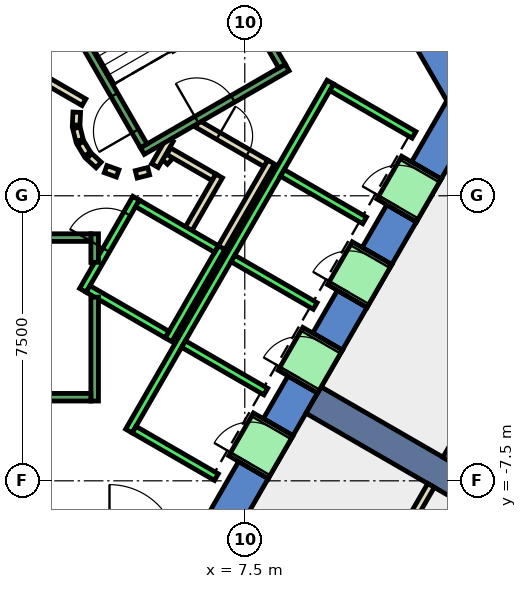
"""IFC4 building model, lengths in metres.
Left out: names, types, materials, properties, quantities, classifications, styles, units other than length and angle.
Written with IfcOpenShell. Run it as: python <this file> out.ifc"""

import sys

from ifc_helpers import new_model, si_unit, direction, frame, frame_2d, origin, place, context, subcontext, project, spatial, polyline, rectangle, outline, extrude, element, fill, save


model = new_model("IFC4")
c1 = context("Model", 3, precision=1e-05, world=origin(), true_north=direction((0.0, 1.0)))
c2 = subcontext(c1, "Body", "Model", "MODEL_VIEW")
j1 = project(units=[si_unit("LENGTHUNIT", "METRE"), si_unit("PLANEANGLEUNIT", "RADIAN")], contexts=[c1])
p1 = place(None, origin())
s1 = spatial("IfcSite", under=j1, at=p1, CompositionType="ELEMENT")
p2 = place(p1, origin())
s2 = spatial("IfcBuilding", under=s1, at=p2, CompositionType="ELEMENT")
p3 = place(p2, frame((0.0, 0.0, 111.8)))
s3 = spatial("IfcBuildingStorey", under=s2, at=p3, CompositionType="ELEMENT", Elevation=111.8)
p4 = place(p3, frame((0.0, 0.0, -0.4)))
e1 = element("IfcWall", 1, at=p4, inside=s3, PredefinedType="SHEAR", context=c2, shape_type="SweptSolid", body=[
    extrude(outline(polyline([(8.517, 11.748), (7.738, 11.298), (12.817, 2.5), (13.856, 2.5), (8.517, 11.748)])), origin(), (0.0, 0.0, 1.0), 4.2),
])
p5 = place(p3, frame((0.0, 0.0, -0.4)))
e2 = element("IfcWall", 2, at=p5, inside=s3, PredefinedType="SHEAR", context=c2, shape_type="SweptSolid", body=[
    extrude(outline(polyline([(8.117, -7.44), (7.338, -6.99), (6.409, -8.6), (6.928, -9.5), (8.117, -7.44)])), origin(), (0.0, 0.0, 1.0), 4.2),
])
p6 = place(p3, frame((0.0, 0.0, -0.4)))
e3 = element("IfcWall", 3, at=p6, inside=s3, PredefinedType="SHEAR", context=c2, shape_type="SweptSolid", body=[
    extrude(outline(polyline([(9.417, -5.189), (8.638, -4.739), (7.988, -5.864), (8.767, -6.314), (9.417, -5.189)])), origin(), (0.0, 0.0, 1.0), 4.2),
])
p7 = place(p3, frame((0.0, 0.0, -0.4)))
e4 = element("IfcWall", 4, at=p7, inside=s3, PredefinedType="SHEAR", context=c2, shape_type="SweptSolid", body=[
    extrude(outline(polyline([(10.717, -2.937), (9.938, -2.487), (9.288, -3.613), (10.067, -4.063), (10.717, -2.937)])), origin(), (0.0, 0.0, 1.0), 4.2),
])
p8 = place(p3, frame((0.0, 0.0, -0.4)))
e5 = element("IfcWall", 5, at=p8, inside=s3, PredefinedType="SHEAR", context=c2, shape_type="SweptSolid", body=[
    extrude(outline(polyline([(12.017, -0.686), (11.238, -0.236), (10.588, -1.361), (11.367, -1.811), (12.017, -0.686)])), origin(), (0.0, 0.0, 1.0), 4.2),
])
p9 = place(p3, frame((0.0, 0.0, -0.4)))
e6 = element("IfcWall", 6, at=p9, inside=s3, PredefinedType="SHEAR", context=c2, shape_type="SweptSolid", body=[
    extrude(outline(polyline([(11.888, 0.89), (12.667, 0.44), (13.856, 2.5), (12.817, 2.5), (11.888, 0.89)])), origin(), (0.0, 0.0, 1.0), 4.2),
])
p10 = place(p3, frame((0.0, 0.0, 3.6)))
e7 = element("IfcWall", 7, at=p10, inside=s3, PredefinedType="SHEAR", context=c2, shape_type="SweptSolid", body=[
    extrude(outline(polyline([(8.767, -6.314), (7.988, -5.864), (7.338, -6.99), (8.117, -7.44), (8.767, -6.314)])), origin(), (0.0, 0.0, 1.0), 0.2),
])
p11 = place(p3, frame((0.0, 0.0, 3.6)))
e8 = element("IfcWall", 8, at=p11, inside=s3, PredefinedType="SHEAR", context=c2, shape_type="SweptSolid", body=[
    extrude(outline(polyline([(10.067, -4.063), (9.288, -3.613), (8.638, -4.739), (9.417, -5.189), (10.067, -4.063)])), origin(), (0.0, 0.0, 1.0), 0.2),
])
p12 = place(p3, frame((0.0, 0.0, 3.6)))
e9 = element("IfcWall", 9, at=p12, inside=s3, PredefinedType="SHEAR", context=c2, shape_type="SweptSolid", body=[
    extrude(outline(polyline([(11.367, -1.811), (10.588, -1.361), (9.938, -2.487), (10.717, -2.937), (11.367, -1.811)])), origin(), (0.0, 0.0, 1.0), 0.2),
])
p13 = place(p3, frame((0.0, 0.0, 3.6)))
e10 = element("IfcWall", 10, at=p13, inside=s3, PredefinedType="SHEAR", context=c2, shape_type="SweptSolid", body=[
    extrude(outline(polyline([(12.667, 0.44), (11.888, 0.89), (11.238, -0.236), (12.017, -0.686), (12.667, 0.44)])), origin(), (0.0, 0.0, 1.0), 0.2),
])
p14 = place(p3, frame((9.31, -5.375, -0.4), z_axis=(0.0, 0.0, 1.0), x_axis=(0.866017533419, -0.500013631625, 0.0)))
e11 = element("IfcWall", 11, at=p14, inside=s3, PredefinedType="SHEAR", context=c2, shape_type="SweptSolid", body=[
    extrude(rectangle(XDim=9.0, YDim=0.8, at=frame_2d((4.5, 0.0))), origin(), (0.0, 0.0, 1.0), 4.2),
])
p15 = place(p3, frame((5.39, 0.898, 0.0), z_axis=(0.0, 0.0, 1.0), x_axis=(0.673828488714, 0.738887791073, 0.0)))
e12 = element("IfcWall", 12, at=p15, inside=s3, PredefinedType="PARTITIONING", context=c2, shape_type="SweptSolid", body=[
    extrude(rectangle(XDim=0.263, YDim=0.2, at=frame_2d((0.131, 0.0))), origin(), (0.0, 0.0, 1.0), 3.8),
])
p16 = place(p3, frame((5.499, 1.172, 0.0), z_axis=(0.0, 0.0, 1.0), x_axis=(0.866333505267, -0.499465972466, 0.0)))
e13 = element("IfcWall", 13, at=p16, inside=s3, PredefinedType="PARTITIONING", context=c2, shape_type="SweptSolid", body=[
    extrude(rectangle(XDim=1.374, YDim=0.2, at=frame_2d((0.687, 0.0))), origin(), (0.0, 0.0, 1.0), 3.8),
])
p17 = place(p3, frame((6.826, 0.522, 0.0), z_axis=(0.0, 0.0, 1.0), x_axis=(-0.500016722714, -0.866015748706, 0.0)))
e14 = element("IfcWall", 14, at=p17, inside=s3, PredefinedType="PARTITIONING", context=c2, shape_type="SweptSolid", body=[
    extrude(rectangle(XDim=1.7, YDim=0.2, at=frame_2d((0.85, 0.0))), origin(), (0.0, 0.0, 1.0), 3.8),
])
p18 = place(p3, frame((6.25, 1.894, 0.0), z_axis=(0.0, 0.0, 1.0), x_axis=(0.866043184279, -0.499969202016, 0.0)))
e15 = element("IfcWall", 15, at=p18, inside=s3, PredefinedType="PARTITIONING", context=c2, shape_type="SweptSolid", body=[
    extrude(rectangle(XDim=2.084, YDim=0.2, at=frame_2d((1.042, 0.0))), origin(), (0.0, 0.0, 1.0), 3.8),
])
p19 = place(p18, frame((0.642, 0.0, 0.0)))
e16 = element("IfcOpeningElement", 16, at=p19, cuts=e15, PredefinedType="OPENING", context=c2, shape_type="SweptSolid", body=[
    extrude(rectangle(XDim=0.9, YDim=2.1, at=frame_2d((0.45, 1.05))), frame((0.0, 0.11, 0.0), z_axis=(0.0, -1.0, 0.0), x_axis=(1.0, 0.0, 0.0)), (0.0, 0.0, 1.0), 0.22),
])
p20 = place(p3, frame((8.192, 0.888, 0.0), z_axis=(0.0, 0.0, 1.0), x_axis=(-0.499940625693, -0.866059680843, 0.0)))
e17 = element("IfcWall", 17, at=p20, inside=s3, PredefinedType="PARTITIONING", context=c2, shape_type="SweptSolid", body=[
    extrude(rectangle(XDim=2.68, YDim=0.2, at=frame_2d((1.34, 0.0))), origin(), (0.0, 0.0, 1.0), 3.8),
])
p21 = place(p3, frame((5.135, 0.793, 0.0), z_axis=(0.0, 0.0, 1.0), x_axis=(0.499526442893, 0.866298639529, 0.0)))
e18 = element("IfcWall", 18, at=p21, inside=s3, PredefinedType="PARTITIONING", context=c2, shape_type="SweptSolid", body=[
    extrude(rectangle(XDim=0.791, YDim=0.2, at=frame_2d((0.396, 0.0))), origin(), (0.0, 0.0, 1.0), 3.8),
])
p22 = place(p3, frame((2.012, 3.186, 0.0), z_axis=(0.0, 0.0, 1.0), x_axis=(0.865891012941, -0.500232699559, 0.0)))
e19 = element("IfcWall", 19, at=p22, inside=s3, PredefinedType="PARTITIONING", context=c2, shape_type="SweptSolid", body=[
    extrude(rectangle(XDim=1.449, YDim=0.2, at=frame_2d((0.725, 0.0))), origin(), (0.0, 0.0, 1.0), 3.8),
])
p23 = place(p3, frame((3.079, 2.199, 0.0), z_axis=(0.0, 0.0, 1.0), x_axis=(-0.047771483479, -0.998858290933, 0.0)))
e20 = element("IfcWall", 20, at=p23, inside=s3, PredefinedType="PARTITIONING", context=c2, shape_type="SweptSolid", body=[
    extrude(rectangle(XDim=0.337, YDim=0.2, at=frame_2d((0.169, 0.0))), origin(), (0.0, 0.0, 1.0), 3.8),
])
p24 = place(p3, frame((3.07, 1.786, 0.0), z_axis=(0.0, 0.0, 1.0), x_axis=(0.242705583207, -0.970099994784, 0.0)))
e21 = element("IfcWall", 21, at=p24, inside=s3, PredefinedType="PARTITIONING", context=c2, shape_type="SweptSolid", body=[
    extrude(rectangle(XDim=0.338, YDim=0.2, at=frame_2d((0.169, 0.0))), origin(), (0.0, 0.0, 1.0), 3.8),
])
for number, where, z_axis, x_axis in (
    (22, (3.182, 1.388, 0.0), (0.0, 0.0, 1.0), (0.512, -0.859, 0.0)),
    (23, (3.404, 1.039, 0.0), (0.0, 0.0, 1.0), (0.74, -0.672, 0.0)),
):
    element("IfcWall", number, at=place(p3, frame(where, z_axis=z_axis, x_axis=x_axis)), inside=s3, PredefinedType="PARTITIONING", context=c2, shape_type="SweptSolid", body=[
        extrude(rectangle(XDim=0.338, YDim=0.2, at=frame_2d((0.169, 0.0))), origin(), (0.0, 0.0, 1.0), 3.8),
    ])
p25 = place(p3, frame((3.838, 0.702, 0.0), z_axis=(0.0, 0.0, 1.0), x_axis=(0.941035081519, -0.338308993895, 0.0)))
e24 = element("IfcWall", 24, at=p25, inside=s3, PredefinedType="PARTITIONING", context=c2, shape_type="SweptSolid", body=[
    extrude(rectangle(XDim=0.337, YDim=0.2, at=frame_2d((0.168, 0.0))), origin(), (0.0, 0.0, 1.0), 3.8),
])
p26 = place(p3, frame((4.644, 0.564, 0.0), z_axis=(0.0, 0.0, 1.0), x_axis=(0.969929076366, 0.243387729394, 0.0)))
e25 = element("IfcWall", 25, at=p26, inside=s3, PredefinedType="PARTITIONING", context=c2, shape_type="SweptSolid", body=[
    extrude(rectangle(XDim=0.337, YDim=0.2, at=frame_2d((0.168, 0.0))), origin(), (0.0, 0.0, 1.0), 3.8),
])
p27 = place(p3, frame((18.301, 2.598, 0.0), z_axis=(0.0, 0.0, 1.0), x_axis=(-0.49997732567, -0.866038494419, 0.0)))
e26 = element("IfcWall", 26, at=p27, inside=s3, PredefinedType="PARTITIONING", context=c2, shape_type="SweptSolid", body=[
    extrude(rectangle(XDim=11.0, YDim=0.2, at=frame_2d((5.5, 0.0))), origin(), (0.0, 0.0, 1.0), 3.8),
])
p28 = place(p3, frame((12.401, -7.621, 0.0), z_axis=(0.0, 0.0, 1.0), x_axis=(-0.499983724212, -0.866034800411, 0.0)))
e27 = element("IfcWall", 27, at=p28, inside=s3, PredefinedType="PARTITIONING", context=c2, shape_type="SweptSolid", body=[
    extrude(rectangle(XDim=9.302, YDim=0.2, at=frame_2d((4.651, 0.0))), origin(), (0.0, 0.0, 1.0), 3.8),
])
p29 = place(p3, frame((3.24, -2.488, 0.0), z_axis=(0.0, 0.0, 1.0), x_axis=(0.49994636267, 0.866056369097, 0.0)))
e28 = element("IfcWall", 28, at=p29, inside=s3, PredefinedType="STANDARD", context=c2, shape_type="SweptSolid", body=[
    extrude(rectangle(XDim=2.8, YDim=0.2, at=frame_2d((1.4, 0.0))), origin(), (0.0, 0.0, 1.0), 3.8),
])
p30 = place(p29, frame((1.225, 0.0, 0.0)))
e29 = element("IfcOpeningElement", 29, at=p30, cuts=e28, PredefinedType="OPENING", context=c2, shape_type="SweptSolid", body=[
    extrude(rectangle(XDim=1.1, YDim=2.1, at=frame_2d((0.55, 1.05))), frame((0.0, 0.11, 0.0), z_axis=(0.0, -1.0, 0.0), x_axis=(1.0, 0.0, 0.0)), (0.0, 0.0, 1.0), 0.22),
])
p31 = place(p3, frame((5.492, -3.788, 0.0), z_axis=(0.0, 0.0, 1.0), x_axis=(0.500011755427, 0.866018616679, 0.0)))
e30 = element("IfcWall", 30, at=p31, inside=s3, PredefinedType="STANDARD", context=c2, shape_type="SweptSolid", body=[
    extrude(rectangle(XDim=2.8, YDim=0.2, at=frame_2d((1.4, 0.0))), origin(), (0.0, 0.0, 1.0), 3.8),
])
p32 = place(p3, frame((3.377, -2.452, 0.0), z_axis=(0.0, 0.0, 1.0), x_axis=(0.865955154139, -0.50012165622, 0.0)))
e31 = element("IfcWall", 31, at=p32, inside=s3, PredefinedType="STANDARD", context=c2, shape_type="SweptSolid", body=[
    extrude(rectangle(XDim=2.4, YDim=0.2, at=frame_2d((1.2, 0.0))), origin(), (0.0, 0.0, 1.0), 3.8),
])
p33 = place(p3, frame((4.677, -0.2, 0.0), z_axis=(0.0, 0.0, 1.0), x_axis=(0.865973769406, -0.500089422704, 0.0)))
e32 = element("IfcWall", 32, at=p33, inside=s3, PredefinedType="STANDARD", context=c2, shape_type="SweptSolid", body=[
    extrude(rectangle(XDim=2.399, YDim=0.2, at=frame_2d((1.2, 0.0))), origin(), (0.0, 0.0, 1.0), 3.8),
])
p34 = place(p3, frame((4.451, -6.19, 0.0), z_axis=(0.0, 0.0, 1.0), x_axis=(0.50000090737, 0.866024879913, 0.0)))
e33 = element("IfcWall", 33, at=p34, inside=s3, PredefinedType="STANDARD", context=c2, shape_type="SweptSolid", body=[
    extrude(rectangle(XDim=10.6, YDim=0.2, at=frame_2d((5.3, 0.0))), origin(), (0.0, 0.0, 1.0), 3.8),
])
for number, where, z_axis, x_axis in (
    (34, (4.588, -6.153, 0.0), (0.0, 0.0, 1.0), (0.866, -0.5, 0.0)),
    (35, (5.888, -3.902, 0.0), (0.0, 0.0, 1.0), (0.866, -0.5, 0.0)),
    (36, (7.188, -1.65, 0.0), (0.0, 0.0, 1.0), (0.866, -0.5, 0.0)),
    (37, (8.488, 0.602, 0.0), (0.0, 0.0, 1.0), (0.866, -0.5, 0.0)),
):
    element("IfcWall", number, at=place(p3, frame(where, z_axis=z_axis, x_axis=x_axis)), inside=s3, PredefinedType="STANDARD", context=c2, shape_type="SweptSolid", body=[
        extrude(rectangle(XDim=2.5, YDim=0.2, at=frame_2d((1.25, 0.0))), origin(), (0.0, 0.0, 1.0), 3.8),
    ])
p35 = place(p3, frame((9.788, 2.853, 0.0), z_axis=(0.0, 0.0, 1.0), x_axis=(0.865998541277, -0.500046524342, 0.0)))
e38 = element("IfcWall", 38, at=p35, inside=s3, PredefinedType="STANDARD", context=c2, shape_type="SweptSolid", body=[
    extrude(rectangle(XDim=2.5, YDim=0.2, at=frame_2d((1.25, 0.0))), origin(), (0.0, 0.0, 1.0), 3.8),
])
p36 = place(p3, frame((7.598, -7.14, 0.0), z_axis=(0.0, 0.0, 1.0), x_axis=(0.500362116554, 0.865816234728, 0.0)))
e39 = element("IfcWall", 39, at=p36, inside=s3, PredefinedType="STANDARD", context=c2, shape_type="SweptSolid", body=[
    extrude(rectangle(XDim=1.299, YDim=1.2, at=frame_2d((0.65, 0.0))), origin(), (0.0, 0.0, 1.0), 2.4),
])
p37 = place(p36, frame((0.1, 0.0, 0.0)))
e40 = element("IfcOpeningElement", 40, at=p37, cuts=e39, PredefinedType="OPENING", context=c2, shape_type="SweptSolid", body=[
    extrude(rectangle(XDim=1.1, YDim=2.3, at=frame_2d((0.55, 1.15))), frame((0.0, 0.61, 0.0), z_axis=(0.0, -1.0, 0.0), x_axis=(1.0, 0.0, 0.0)), (0.0, 0.0, 1.0), 1.22),
])
p38 = place(p3, frame((8.898, -4.889, 0.0), z_axis=(0.0, 0.0, 1.0), x_axis=(0.500036693733, 0.866004217611, 0.0)))
e41 = element("IfcWall", 41, at=p38, inside=s3, PredefinedType="STANDARD", context=c2, shape_type="SweptSolid", body=[
    extrude(rectangle(XDim=1.3, YDim=1.2, at=frame_2d((0.65, 0.0))), origin(), (0.0, 0.0, 1.0), 2.4),
])
p39 = place(p38, frame((0.1, 0.0, 0.0)))
e42 = element("IfcOpeningElement", 42, at=p39, cuts=e41, PredefinedType="OPENING", context=c2, shape_type="SweptSolid", body=[
    extrude(rectangle(XDim=1.1, YDim=2.3, at=frame_2d((0.55, 1.15))), frame((0.0, 0.61, 0.0), z_axis=(0.0, -1.0, 0.0), x_axis=(1.0, 0.0, 0.0)), (0.0, 0.0, 1.0), 1.22),
])
p40 = place(p3, frame((10.198, -2.637, 0.0), z_axis=(0.0, 0.0, 1.0), x_axis=(0.49989585183, 0.866085525409, 0.0)))
e43 = element("IfcWall", 43, at=p40, inside=s3, PredefinedType="STANDARD", context=c2, shape_type="SweptSolid", body=[
    extrude(rectangle(XDim=1.3, YDim=1.2, at=frame_2d((0.65, 0.0))), origin(), (0.0, 0.0, 1.0), 2.4),
])
p41 = place(p40, frame((0.1, 0.0, 0.0)))
e44 = element("IfcOpeningElement", 44, at=p41, cuts=e43, PredefinedType="OPENING", context=c2, shape_type="SweptSolid", body=[
    extrude(rectangle(XDim=1.1, YDim=2.3, at=frame_2d((0.55, 1.15))), frame((0.0, 0.61, 0.0), z_axis=(0.0, -1.0, 0.0), x_axis=(1.0, 0.0, 0.0)), (0.0, 0.0, 1.0), 1.22),
])
p42 = place(p3, frame((11.498, -0.385, 0.0), z_axis=(0.0, 0.0, 1.0), x_axis=(0.500221244143, 0.865897630733, 0.0)))
e45 = element("IfcWall", 45, at=p42, inside=s3, PredefinedType="STANDARD", context=c2, shape_type="SweptSolid", body=[
    extrude(rectangle(XDim=1.299, YDim=1.2, at=frame_2d((0.65, 0.0))), origin(), (0.0, 0.0, 1.0), 2.4),
])
p43 = place(p42, frame((0.1, 0.0, 0.0)))
e46 = element("IfcOpeningElement", 46, at=p43, cuts=e45, PredefinedType="OPENING", context=c2, shape_type="SweptSolid", body=[
    extrude(rectangle(XDim=1.1, YDim=2.3, at=frame_2d((0.55, 1.15))), frame((0.0, 0.61, 0.0), z_axis=(0.0, -1.0, 0.0), x_axis=(1.0, 0.0, 0.0)), (0.0, 0.0, 1.0), 1.22),
])
p44 = place(p3, frame((3.55, -2.667, 0.0), z_axis=(0.0, 0.0, 1.0), x_axis=(0.0, -1.0, 0.0)))
e47 = element("IfcWall", 47, at=p44, inside=s3, PredefinedType="STANDARD", context=c2, shape_type="SweptSolid", body=[
    extrude(rectangle(XDim=2.733, YDim=0.2, at=frame_2d((1.366, 0.0))), origin(), (0.0, 0.0, 1.0), 3.8),
])
p45 = place(p3, frame((3.55, -1.0, 0.0), z_axis=(0.0, 0.0, 1.0), x_axis=(0.0, -1.0, 0.0)))
e48 = element("IfcWall", 48, at=p45, inside=s3, PredefinedType="STANDARD", context=c2, shape_type="SweptSolid", body=[
    extrude(rectangle(XDim=0.751, YDim=0.2, at=frame_2d((0.375, 0.0))), origin(), (0.0, 0.0, 1.0), 3.8),
])
p46 = place(p3, frame((-3.45, -1.1, 0.0), z_axis=(0.0, 0.0, 1.0), x_axis=(1.0, 0.0, 0.0)))
e49 = element("IfcWall", 49, at=p46, inside=s3, PredefinedType="STANDARD", context=c2, shape_type="SweptSolid", body=[
    extrude(rectangle(XDim=6.9, YDim=0.2, at=frame_2d((3.45, 0.0))), origin(), (0.0, 0.0, 1.0), 3.8),
])
p47 = place(p46, frame((0.45, 0.0, 0.0)))
e50 = element("IfcOpeningElement", 50, at=p47, cuts=e49, PredefinedType="OPENING", context=c2, shape_type="SweptSolid", body=[
    extrude(rectangle(XDim=1.1, YDim=2.2, at=frame_2d((0.55, 1.1))), frame((0.0, 0.11, 0.0), z_axis=(0.0, -1.0, 0.0), x_axis=(1.0, 0.0, 0.0)), (0.0, 0.0, 1.0), 0.22),
])
p48 = place(p3, frame((-3.45, -5.3, 0.0), z_axis=(0.0, 0.0, 1.0), x_axis=(1.0, 0.0, 0.0)))
e51 = element("IfcWall", 51, at=p48, inside=s3, PredefinedType="STANDARD", context=c2, shape_type="SweptSolid", body=[
    extrude(rectangle(XDim=6.9, YDim=0.2, at=frame_2d((3.45, 0.0))), origin(), (0.0, 0.0, 1.0), 3.8),
])
p49 = place(p3, frame((4.806, 1.176, 0.0), z_axis=(0.0, 0.0, 1.0), x_axis=(0.866059941101, 0.499940174841, 0.0)))
e52 = element("IfcWall", 52, at=p49, inside=s3, PredefinedType="STANDARD", context=c2, shape_type="SweptSolid", body=[
    extrude(rectangle(XDim=4.4, YDim=0.2, at=frame_2d((2.2, 0.0))), origin(), (0.0, 0.0, 1.0), 3.8),
])
p50 = place(p49, frame((1.65, 0.0, 0.0)))
e53 = element("IfcOpeningElement", 53, at=p50, cuts=e52, PredefinedType="OPENING", context=c2, shape_type="SweptSolid", body=[
    extrude(rectangle(XDim=1.1, YDim=2.2, at=frame_2d((0.55, 1.1))), frame((0.0, 0.11, 0.0), z_axis=(0.0, -1.0, 0.0), x_axis=(1.0, 0.0, 0.0)), (0.0, 0.0, 1.0), 0.22),
])
p51 = place(p3, frame((4.843, 1.312, 0.0), z_axis=(0.0, 0.0, 1.0), x_axis=(-0.499963383562, 0.866046543262, 0.0)))
e54 = element("IfcWall", 54, at=p51, inside=s3, PredefinedType="STANDARD", context=c2, shape_type="SweptSolid", body=[
    extrude(rectangle(XDim=6.9, YDim=0.2, at=frame_2d((3.45, 0.0))), origin(), (0.0, 0.0, 1.0), 3.8),
])
p52 = place(p51, frame((0.45, 0.0, 0.0)))
e55 = element("IfcOpeningElement", 55, at=p52, cuts=e54, PredefinedType="OPENING", context=c2, shape_type="SweptSolid", body=[
    extrude(rectangle(XDim=1.1, YDim=2.2, at=frame_2d((0.55, 1.1))), frame((0.0, 0.11, 0.0), z_axis=(0.0, -1.0, 0.0), x_axis=(1.0, 0.0, 0.0)), (0.0, 0.0, 1.0), 0.22),
])
p53 = place(p3, frame((8.48, 3.412, 0.0), z_axis=(0.0, 0.0, 1.0), x_axis=(-0.499978703459, 0.866037698999, 0.0)))
e56 = element("IfcWall", 56, at=p53, inside=s3, PredefinedType="STANDARD", context=c2, shape_type="SweptSolid", body=[
    extrude(rectangle(XDim=6.9, YDim=0.2, at=frame_2d((3.45, 0.0))), origin(), (0.0, 0.0, 1.0), 3.8),
])
p54 = place(p19, origin())
e57 = element("IfcDoor", 57, at=p54, inside=s3, OperationType="SINGLE_SWING_LEFT", PredefinedType="DOOR", context=c2, shape_type="SweptSolid", body=[
    extrude(rectangle(XDim=0.9, YDim=2.1, at=frame_2d((0.45, 1.05))), frame((0.0, 0.025, 0.0), z_axis=(0.0, -1.0, 0.0), x_axis=(1.0, 0.0, 0.0)), (0.0, 0.0, 1.0), 0.05),
])
fill(e16, e57)
p55 = place(p37, origin())
e58 = element("IfcDoor", 58, at=p55, inside=s3, OperationType="SLIDING_TO_LEFT", PredefinedType="DOOR", context=c2, shape_type="SweptSolid", body=[
    extrude(rectangle(XDim=1.1, YDim=2.3, at=frame_2d((0.55, 1.15))), frame((0.0, 0.025, 0.0), z_axis=(0.0, -1.0, 0.0), x_axis=(1.0, 0.0, 0.0)), (0.0, 0.0, 1.0), 0.05),
])
fill(e40, e58)
p56 = place(p39, origin())
e59 = element("IfcDoor", 59, at=p56, inside=s3, OperationType="SLIDING_TO_LEFT", PredefinedType="DOOR", context=c2, shape_type="SweptSolid", body=[
    extrude(rectangle(XDim=1.1, YDim=2.3, at=frame_2d((0.55, 1.15))), frame((0.0, 0.025, 0.0), z_axis=(0.0, -1.0, 0.0), x_axis=(1.0, 0.0, 0.0)), (0.0, 0.0, 1.0), 0.05),
])
fill(e42, e59)
p57 = place(p41, origin())
e60 = element("IfcDoor", 60, at=p57, inside=s3, OperationType="SLIDING_TO_LEFT", PredefinedType="DOOR", context=c2, shape_type="SweptSolid", body=[
    extrude(rectangle(XDim=1.1, YDim=2.3, at=frame_2d((0.55, 1.15))), frame((0.0, 0.025, 0.0), z_axis=(0.0, -1.0, 0.0), x_axis=(1.0, 0.0, 0.0)), (0.0, 0.0, 1.0), 0.05),
])
fill(e44, e60)
p58 = place(p43, origin())
e61 = element("IfcDoor", 61, at=p58, inside=s3, OperationType="SLIDING_TO_LEFT", PredefinedType="DOOR", context=c2, shape_type="SweptSolid", body=[
    extrude(rectangle(XDim=1.1, YDim=2.3, at=frame_2d((0.55, 1.15))), frame((0.0, 0.025, 0.0), z_axis=(0.0, -1.0, 0.0), x_axis=(1.0, 0.0, 0.0)), (0.0, 0.0, 1.0), 0.05),
])
fill(e46, e61)
p59 = place(p30, origin())
e62 = element("IfcDoor", 62, at=p59, inside=s3, OperationType="SLIDING_TO_LEFT", PredefinedType="DOOR", context=c2, shape_type="SweptSolid", body=[
    extrude(rectangle(XDim=1.1, YDim=2.1, at=frame_2d((0.55, 1.05))), frame((0.0, 0.025, 0.0), z_axis=(0.0, -1.0, 0.0), x_axis=(1.0, 0.0, 0.0)), (0.0, 0.0, 1.0), 0.05),
])
fill(e29, e62)
p60 = place(p52, origin())
e63 = element("IfcDoor", 63, at=p60, inside=s3, OperationType="SINGLE_SWING_LEFT", PredefinedType="DOOR", context=c2, shape_type="SweptSolid", body=[
    extrude(rectangle(XDim=1.1, YDim=2.2, at=frame_2d((0.55, 1.1))), frame((0.0, 0.025, 0.0), z_axis=(0.0, -1.0, 0.0), x_axis=(1.0, 0.0, 0.0)), (0.0, 0.0, 1.0), 0.05),
])
fill(e55, e63)
p61 = place(p50, origin())
e64 = element("IfcDoor", 64, at=p61, inside=s3, OperationType="SINGLE_SWING_LEFT", PredefinedType="DOOR", context=c2, shape_type="SweptSolid", body=[
    extrude(rectangle(XDim=1.1, YDim=2.2, at=frame_2d((0.55, 1.1))), frame((0.0, 0.025, 0.0), z_axis=(0.0, -1.0, 0.0), x_axis=(1.0, 0.0, 0.0)), (0.0, 0.0, 1.0), 0.05),
])
fill(e53, e64)
save(model, sys.argv[1])
